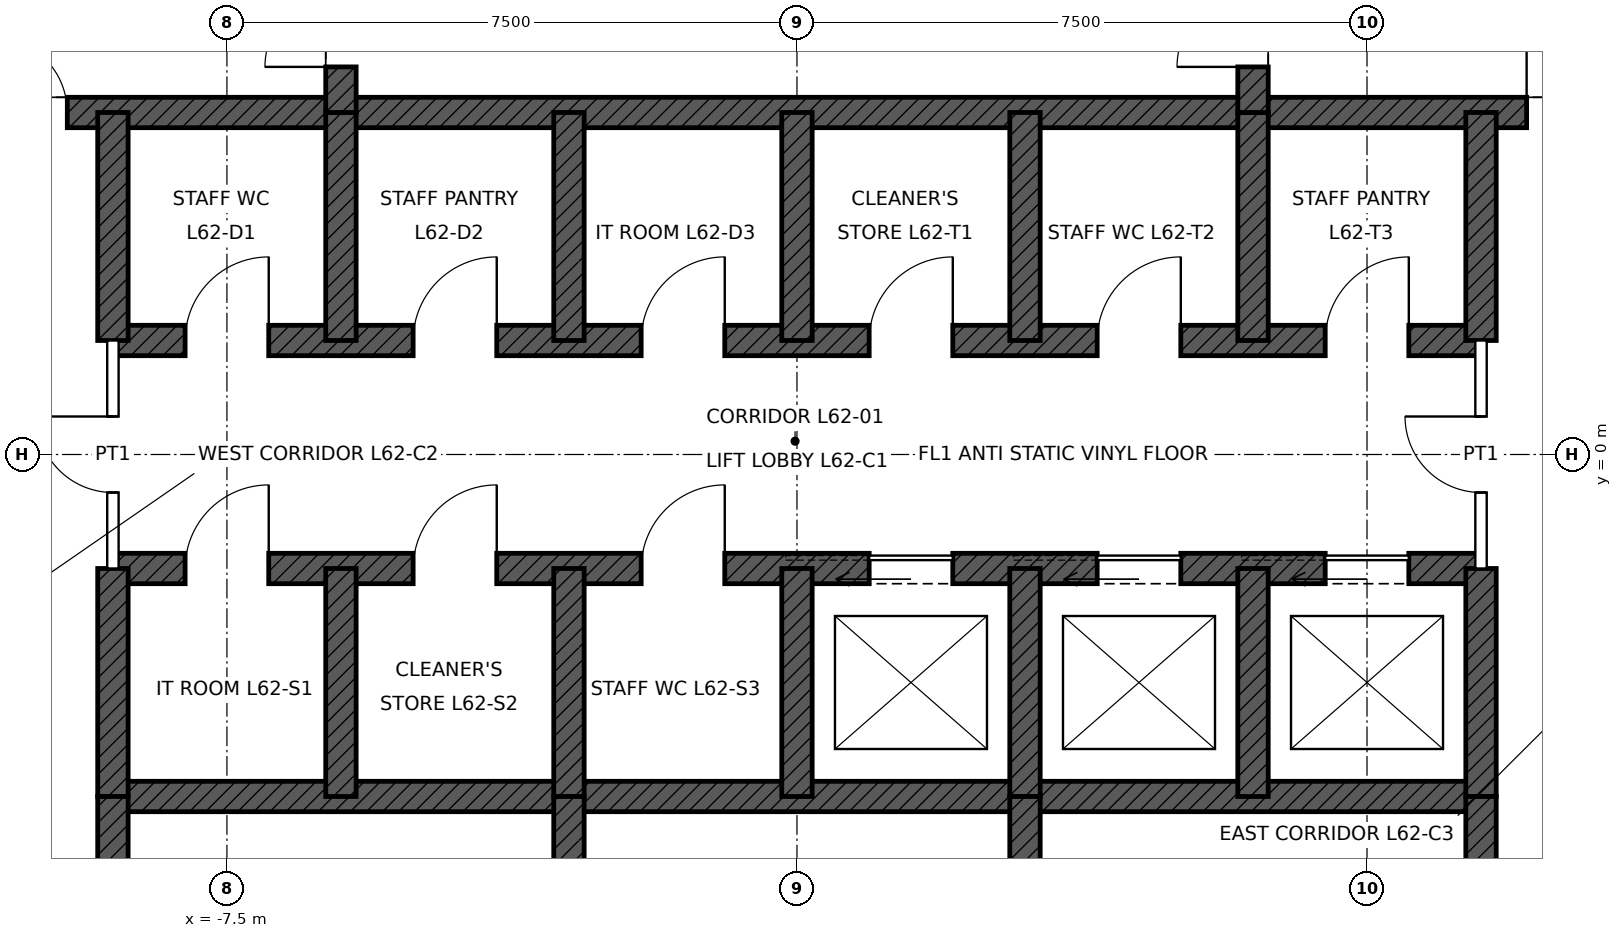
"""IFC4 building model, lengths in metres.
Left out: names, types, materials, properties, quantities, classifications, styles, units other than length and angle.
Written with IfcOpenShell. Run it as: python <this file> out.ifc"""

import sys

from ifc_helpers import new_model, si_unit, direction, frame, frame_2d, origin, place, context, subcontext, project, spatial, rectangle, extrude, element, fill, save


model = new_model("IFC4")
c1 = context("Model", 3, precision=1e-05, world=origin(), true_north=direction((0.0, 1.0)))
c2 = subcontext(c1, "Body", "Model", "MODEL_VIEW")
j1 = project(units=[si_unit("LENGTHUNIT", "METRE"), si_unit("PLANEANGLEUNIT", "RADIAN")], contexts=[c1])
p1 = place(None, origin())
s1 = spatial("IfcSite", under=j1, at=p1, CompositionType="ELEMENT")
p2 = place(p1, origin())
s2 = spatial("IfcBuilding", under=s1, at=p2, CompositionType="ELEMENT")
p3 = place(p2, frame((0.0, 0.0, 283.9)))
s3 = spatial("IfcBuildingStorey", under=s2, at=p3, CompositionType="ELEMENT", Elevation=283.9)
p4 = place(p3, frame((-11.0, 4.5, 0.0), z_axis=(0.0, 0.0, 1.0), x_axis=(1.0, 0.0, 0.0)))
e1 = element("IfcWall", 1, at=p4, inside=s3, PredefinedType="SHEAR", context=c2, shape_type="SweptSolid", body=[
    extrude(rectangle(XDim=22.0, YDim=0.4, at=frame_2d((11.0, 0.0))), origin(), (0.0, 0.0, 1.0), 4.0),
])
p5 = place(p4, frame((0.4, 0.0, 0.0)))
e2 = element("IfcOpeningElement", 2, at=p5, cuts=e1, PredefinedType="OPENING", context=c2, shape_type="SweptSolid", body=[
    extrude(rectangle(XDim=1.0, YDim=2.1, at=frame_2d((0.5, 1.05))), frame((0.0, 0.21, 0.0), z_axis=(0.0, -1.0, 0.0), x_axis=(1.0, 0.0, 0.0)), (0.0, 0.0, 1.0), 0.42),
])
p6 = place(p4, frame((20.6, 0.0, 0.0)))
e3 = element("IfcOpeningElement", 3, at=p6, cuts=e1, PredefinedType="OPENING", context=c2, shape_type="SweptSolid", body=[
    extrude(rectangle(XDim=1.0, YDim=2.1, at=frame_2d((0.5, 1.05))), frame((0.0, 0.21, 0.0), z_axis=(0.0, -1.0, 0.0), x_axis=(1.0, 0.0, 0.0)), (0.0, 0.0, 1.0), 0.42),
])
p7 = place(p3, frame((-9.0, 1.5, 0.0), z_axis=(0.0, 0.0, 1.0), x_axis=(1.0, 0.0, 0.0)))
e4 = element("IfcWall", 4, at=p7, inside=s3, PredefinedType="SHEAR", context=c2, shape_type="SweptSolid", body=[
    extrude(rectangle(XDim=18.0, YDim=0.4, at=frame_2d((9.0, 0.0))), origin(), (0.0, 0.0, 1.0), 4.0),
])
p8 = place(p7, frame((0.95, 0.0, 0.0)))
e5 = element("IfcOpeningElement", 5, at=p8, cuts=e4, PredefinedType="OPENING", context=c2, shape_type="SweptSolid", body=[
    extrude(rectangle(XDim=1.1, YDim=2.1, at=frame_2d((0.55, 1.05))), frame((0.0, 0.21, 0.0), z_axis=(0.0, -1.0, 0.0), x_axis=(1.0, 0.0, 0.0)), (0.0, 0.0, 1.0), 0.42),
])
p9 = place(p7, frame((3.95, 0.0, 0.0)))
e6 = element("IfcOpeningElement", 6, at=p9, cuts=e4, PredefinedType="OPENING", context=c2, shape_type="SweptSolid", body=[
    extrude(rectangle(XDim=1.1, YDim=2.1, at=frame_2d((0.55, 1.05))), frame((0.0, 0.21, 0.0), z_axis=(0.0, -1.0, 0.0), x_axis=(1.0, 0.0, 0.0)), (0.0, 0.0, 1.0), 0.42),
])
p10 = place(p7, frame((6.95, 0.0, 0.0)))
e7 = element("IfcOpeningElement", 7, at=p10, cuts=e4, PredefinedType="OPENING", context=c2, shape_type="SweptSolid", body=[
    extrude(rectangle(XDim=1.1, YDim=2.1, at=frame_2d((0.55, 1.05))), frame((0.0, 0.21, 0.0), z_axis=(0.0, -1.0, 0.0), x_axis=(1.0, 0.0, 0.0)), (0.0, 0.0, 1.0), 0.42),
])
p11 = place(p7, frame((9.95, 0.0, 0.0)))
e8 = element("IfcOpeningElement", 8, at=p11, cuts=e4, PredefinedType="OPENING", context=c2, shape_type="SweptSolid", body=[
    extrude(rectangle(XDim=1.1, YDim=2.1, at=frame_2d((0.55, 1.05))), frame((0.0, 0.21, 0.0), z_axis=(0.0, -1.0, 0.0), x_axis=(1.0, 0.0, 0.0)), (0.0, 0.0, 1.0), 0.42),
])
p12 = place(p7, frame((12.95, 0.0, 0.0)))
e9 = element("IfcOpeningElement", 9, at=p12, cuts=e4, PredefinedType="OPENING", context=c2, shape_type="SweptSolid", body=[
    extrude(rectangle(XDim=1.1, YDim=2.1, at=frame_2d((0.55, 1.05))), frame((0.0, 0.21, 0.0), z_axis=(0.0, -1.0, 0.0), x_axis=(1.0, 0.0, 0.0)), (0.0, 0.0, 1.0), 0.42),
])
p13 = place(p7, frame((15.95, 0.0, 0.0)))
e10 = element("IfcOpeningElement", 10, at=p13, cuts=e4, PredefinedType="OPENING", context=c2, shape_type="SweptSolid", body=[
    extrude(rectangle(XDim=1.1, YDim=2.1, at=frame_2d((0.55, 1.05))), frame((0.0, 0.21, 0.0), z_axis=(0.0, -1.0, 0.0), x_axis=(1.0, 0.0, 0.0)), (0.0, 0.0, 1.0), 0.42),
])
p14 = place(p3, frame((-9.0, -1.5, 0.0), z_axis=(0.0, 0.0, 1.0), x_axis=(1.0, 0.0, 0.0)))
e11 = element("IfcWall", 11, at=p14, inside=s3, PredefinedType="SHEAR", context=c2, shape_type="SweptSolid", body=[
    extrude(rectangle(XDim=18.0, YDim=0.4, at=frame_2d((9.0, 0.0))), origin(), (0.0, 0.0, 1.0), 4.0),
])
p15 = place(p14, frame((9.95, 0.0, 0.0)))
e12 = element("IfcOpeningElement", 12, at=p15, cuts=e11, PredefinedType="OPENING", context=c2, shape_type="SweptSolid", body=[
    extrude(rectangle(XDim=1.1, YDim=2.1, at=frame_2d((0.55, 1.05))), frame((0.0, 0.21, 0.0), z_axis=(0.0, -1.0, 0.0), x_axis=(1.0, 0.0, 0.0)), (0.0, 0.0, 1.0), 0.42),
])
p16 = place(p14, frame((12.95, 0.0, 0.0)))
e13 = element("IfcOpeningElement", 13, at=p16, cuts=e11, PredefinedType="OPENING", context=c2, shape_type="SweptSolid", body=[
    extrude(rectangle(XDim=1.1, YDim=2.1, at=frame_2d((0.55, 1.05))), frame((0.0, 0.21, 0.0), z_axis=(0.0, -1.0, 0.0), x_axis=(1.0, 0.0, 0.0)), (0.0, 0.0, 1.0), 0.42),
])
p17 = place(p14, frame((15.95, 0.0, 0.0)))
e14 = element("IfcOpeningElement", 14, at=p17, cuts=e11, PredefinedType="OPENING", context=c2, shape_type="SweptSolid", body=[
    extrude(rectangle(XDim=1.1, YDim=2.1, at=frame_2d((0.55, 1.05))), frame((0.0, 0.21, 0.0), z_axis=(0.0, -1.0, 0.0), x_axis=(1.0, 0.0, 0.0)), (0.0, 0.0, 1.0), 0.42),
])
p18 = place(p14, frame((0.95, 0.0, 0.0)))
e15 = element("IfcOpeningElement", 15, at=p18, cuts=e11, PredefinedType="OPENING", context=c2, shape_type="SweptSolid", body=[
    extrude(rectangle(XDim=1.1, YDim=2.1, at=frame_2d((0.55, 1.05))), frame((0.0, 0.21, 0.0), z_axis=(0.0, -1.0, 0.0), x_axis=(1.0, 0.0, 0.0)), (0.0, 0.0, 1.0), 0.42),
])
p19 = place(p14, frame((3.95, 0.0, 0.0)))
e16 = element("IfcOpeningElement", 16, at=p19, cuts=e11, PredefinedType="OPENING", context=c2, shape_type="SweptSolid", body=[
    extrude(rectangle(XDim=1.1, YDim=2.1, at=frame_2d((0.55, 1.05))), frame((0.0, 0.21, 0.0), z_axis=(0.0, -1.0, 0.0), x_axis=(1.0, 0.0, 0.0)), (0.0, 0.0, 1.0), 0.42),
])
p20 = place(p14, frame((6.95, 0.0, 0.0)))
e17 = element("IfcOpeningElement", 17, at=p20, cuts=e11, PredefinedType="OPENING", context=c2, shape_type="SweptSolid", body=[
    extrude(rectangle(XDim=1.1, YDim=2.1, at=frame_2d((0.55, 1.05))), frame((0.0, 0.21, 0.0), z_axis=(0.0, -1.0, 0.0), x_axis=(1.0, 0.0, 0.0)), (0.0, 0.0, 1.0), 0.42),
])
p21 = place(p3, frame((-9.0, -4.5, 0.0), z_axis=(0.0, 0.0, 1.0), x_axis=(1.0, 0.0, 0.0)))
e18 = element("IfcWall", 18, at=p21, inside=s3, PredefinedType="SHEAR", context=c2, shape_type="SweptSolid", body=[
    extrude(rectangle(XDim=18.0, YDim=0.4, at=frame_2d((9.0, 0.0))), origin(), (0.0, 0.0, 1.0), 4.0),
])
for number, where, z_axis, x_axis in (
    (19, (-9.0, 1.5, 0.0), (0.0, 0.0, 1.0), (0.0, 1.0, 0.0)),
    (20, (9.0, 1.5, 0.0), (0.0, 0.0, 1.0), (0.0, 1.0, 0.0)),
    (21, (-9.0, -4.5, 0.0), (0.0, 0.0, 1.0), (0.0, 1.0, 0.0)),
    (22, (9.0, -4.5, 0.0), (0.0, 0.0, 1.0), (0.0, 1.0, 0.0)),
    (23, (-6.0, 1.5, 0.0), (0.0, 0.0, 1.0), (0.0, 1.0, 0.0)),
    (24, (-3.0, 1.5, 0.0), (0.0, 0.0, 1.0), (0.0, 1.0, 0.0)),
    (25, (0.0, 1.5, 0.0), (0.0, 0.0, 1.0), (0.0, 1.0, 0.0)),
    (26, (3.0, 1.5, 0.0), (0.0, 0.0, 1.0), (0.0, 1.0, 0.0)),
    (27, (6.0, 1.5, 0.0), (0.0, 0.0, 1.0), (0.0, 1.0, 0.0)),
    (28, (-6.0, -4.5, 0.0), (0.0, 0.0, 1.0), (0.0, 1.0, 0.0)),
    (29, (-3.0, -4.5, 0.0), (0.0, 0.0, 1.0), (0.0, 1.0, 0.0)),
    (30, (0.0, -4.5, 0.0), (0.0, 0.0, 1.0), (0.0, 1.0, 0.0)),
    (31, (3.0, -4.5, 0.0), (0.0, 0.0, 1.0), (0.0, 1.0, 0.0)),
    (32, (6.0, -4.5, 0.0), (0.0, 0.0, 1.0), (0.0, 1.0, 0.0)),
):
    element("IfcWall", number, at=place(p3, frame(where, z_axis=z_axis, x_axis=x_axis)), inside=s3, PredefinedType="SHEAR", context=c2, shape_type="SweptSolid", body=[
        extrude(rectangle(XDim=3.0, YDim=0.4, at=frame_2d((1.5, 0.0))), origin(), (0.0, 0.0, 1.0), 4.0),
    ])
p22 = place(p3, frame((-6.0, 4.5, 0.0), z_axis=(0.0, 0.0, 1.0), x_axis=(0.0, 1.0, 0.0)))
e33 = element("IfcWall", 33, at=p22, inside=s3, PredefinedType="SHEAR", context=c2, shape_type="SweptSolid", body=[
    extrude(rectangle(XDim=6.5, YDim=0.4, at=frame_2d((3.25, 0.0))), origin(), (0.0, 0.0, 1.0), 4.0),
])
p23 = place(p22, frame((0.6, 0.0, 0.0)))
e34 = element("IfcOpeningElement", 34, at=p23, cuts=e33, PredefinedType="OPENING", context=c2, shape_type="SweptSolid", body=[
    extrude(rectangle(XDim=1.0, YDim=2.1, at=frame_2d((0.5, 1.05))), frame((0.0, 0.21, 0.0), z_axis=(0.0, -1.0, 0.0), x_axis=(1.0, 0.0, 0.0)), (0.0, 0.0, 1.0), 0.42),
])
p24 = place(p3, frame((6.0, 4.5, 0.0), z_axis=(0.0, 0.0, 1.0), x_axis=(0.0, 1.0, 0.0)))
e35 = element("IfcWall", 35, at=p24, inside=s3, PredefinedType="SHEAR", context=c2, shape_type="SweptSolid", body=[
    extrude(rectangle(XDim=6.5, YDim=0.4, at=frame_2d((3.25, 0.0))), origin(), (0.0, 0.0, 1.0), 4.0),
])
p25 = place(p24, frame((0.6, 0.0, 0.0)))
e36 = element("IfcOpeningElement", 36, at=p25, cuts=e35, PredefinedType="OPENING", context=c2, shape_type="SweptSolid", body=[
    extrude(rectangle(XDim=1.0, YDim=2.1, at=frame_2d((0.5, 1.05))), frame((0.0, 0.21, 0.0), z_axis=(0.0, -1.0, 0.0), x_axis=(1.0, 0.0, 0.0)), (0.0, 0.0, 1.0), 0.42),
])
p26 = place(p3, frame((-9.0, -11.0, 0.0), z_axis=(0.0, 0.0, 1.0), x_axis=(0.0, 1.0, 0.0)))
e37 = element("IfcWall", 37, at=p26, inside=s3, PredefinedType="SHEAR", context=c2, shape_type="SweptSolid", body=[
    extrude(rectangle(XDim=6.5, YDim=0.4, at=frame_2d((3.25, 0.0))), origin(), (0.0, 0.0, 1.0), 4.0),
])
p27 = place(p26, frame((4.25, 0.0, 0.0)))
e38 = element("IfcOpeningElement", 38, at=p27, cuts=e37, PredefinedType="OPENING", context=c2, shape_type="SweptSolid", body=[
    extrude(rectangle(XDim=1.0, YDim=2.1, at=frame_2d((0.5, 1.05))), frame((0.0, 0.21, 0.0), z_axis=(0.0, -1.0, 0.0), x_axis=(1.0, 0.0, 0.0)), (0.0, 0.0, 1.0), 0.42),
])
p28 = place(p3, frame((9.0, -11.0, 0.0), z_axis=(0.0, 0.0, 1.0), x_axis=(0.0, 1.0, 0.0)))
e39 = element("IfcWall", 39, at=p28, inside=s3, PredefinedType="SHEAR", context=c2, shape_type="SweptSolid", body=[
    extrude(rectangle(XDim=6.5, YDim=0.4, at=frame_2d((3.25, 0.0))), origin(), (0.0, 0.0, 1.0), 4.0),
])
p29 = place(p28, frame((4.25, 0.0, 0.0)))
e40 = element("IfcOpeningElement", 40, at=p29, cuts=e39, PredefinedType="OPENING", context=c2, shape_type="SweptSolid", body=[
    extrude(rectangle(XDim=1.0, YDim=2.1, at=frame_2d((0.5, 1.05))), frame((0.0, 0.21, 0.0), z_axis=(0.0, -1.0, 0.0), x_axis=(1.0, 0.0, 0.0)), (0.0, 0.0, 1.0), 0.42),
])
for number, where, z_axis, x_axis in (
    (41, (-3.0, -11.0, 0.0), (0.0, 0.0, 1.0), (0.0, 1.0, 0.0)),
    (42, (3.0, -11.0, 0.0), (0.0, 0.0, 1.0), (0.0, 1.0, 0.0)),
):
    element("IfcWall", number, at=place(p3, frame(where, z_axis=z_axis, x_axis=x_axis)), inside=s3, PredefinedType="SHEAR", context=c2, shape_type="SweptSolid", body=[
        extrude(rectangle(XDim=6.5, YDim=0.4, at=frame_2d((3.25, 0.0))), origin(), (0.0, 0.0, 1.0), 4.0),
    ])
p30 = place(p3, frame((-9.0, -1.5, 0.0), z_axis=(0.0, 0.0, 1.0), x_axis=(0.0, 1.0, 0.0)))
e43 = element("IfcWall", 43, at=p30, inside=s3, PredefinedType="PARTITIONING", context=c2, shape_type="SweptSolid", body=[
    extrude(rectangle(XDim=3.0, YDim=0.15, at=frame_2d((1.5, 0.0))), origin(), (0.0, 0.0, 1.0), 3.75),
])
p31 = place(p30, frame((1.0, 0.0, 0.0)))
e44 = element("IfcOpeningElement", 44, at=p31, cuts=e43, PredefinedType="OPENING", context=c2, shape_type="SweptSolid", body=[
    extrude(rectangle(XDim=1.0, YDim=2.4, at=frame_2d((0.5, 1.2))), frame((0.0, 0.085, 0.0), z_axis=(0.0, -1.0, 0.0), x_axis=(1.0, 0.0, 0.0)), (0.0, 0.0, 1.0), 0.17),
])
p32 = place(p3, frame((9.0, -1.5, 0.0), z_axis=(0.0, 0.0, 1.0), x_axis=(0.0, 1.0, 0.0)))
e45 = element("IfcWall", 45, at=p32, inside=s3, PredefinedType="PARTITIONING", context=c2, shape_type="SweptSolid", body=[
    extrude(rectangle(XDim=3.0, YDim=0.15, at=frame_2d((1.5, 0.0))), origin(), (0.0, 0.0, 1.0), 3.75),
])
p33 = place(p32, frame((1.0, 0.0, 0.0)))
e46 = element("IfcOpeningElement", 46, at=p33, cuts=e45, PredefinedType="OPENING", context=c2, shape_type="SweptSolid", body=[
    extrude(rectangle(XDim=1.0, YDim=2.4, at=frame_2d((0.5, 1.2))), frame((0.0, 0.085, 0.0), z_axis=(0.0, -1.0, 0.0), x_axis=(1.0, 0.0, 0.0)), (0.0, 0.0, 1.0), 0.17),
])
p34 = place(p5, origin())
e47 = element("IfcDoor", 47, at=p34, inside=s3, OperationType="SINGLE_SWING_LEFT", PredefinedType="DOOR", context=c2, shape_type="SweptSolid", body=[
    extrude(rectangle(XDim=1.0, YDim=2.1, at=frame_2d((0.5, 1.05))), frame((0.0, 0.025, 0.0), z_axis=(0.0, -1.0, 0.0), x_axis=(1.0, 0.0, 0.0)), (0.0, 0.0, 1.0), 0.05),
])
fill(e2, e47)
p35 = place(p6, origin())
e48 = element("IfcDoor", 48, at=p35, inside=s3, OperationType="SINGLE_SWING_LEFT", PredefinedType="DOOR", context=c2, shape_type="SweptSolid", body=[
    extrude(rectangle(XDim=1.0, YDim=2.1, at=frame_2d((0.5, 1.05))), frame((0.0, 0.025, 0.0), z_axis=(0.0, -1.0, 0.0), x_axis=(1.0, 0.0, 0.0)), (0.0, 0.0, 1.0), 0.05),
])
fill(e3, e48)
p36 = place(p23, origin())
e49 = element("IfcDoor", 49, at=p36, inside=s3, OperationType="SINGLE_SWING_LEFT", PredefinedType="DOOR", context=c2, shape_type="SweptSolid", body=[
    extrude(rectangle(XDim=1.0, YDim=2.1, at=frame_2d((0.5, 1.05))), frame((0.0, 0.025, 0.0), z_axis=(0.0, -1.0, 0.0), x_axis=(1.0, 0.0, 0.0)), (0.0, 0.0, 1.0), 0.05),
])
fill(e34, e49)
p37 = place(p25, origin())
e50 = element("IfcDoor", 50, at=p37, inside=s3, OperationType="SINGLE_SWING_LEFT", PredefinedType="DOOR", context=c2, shape_type="SweptSolid", body=[
    extrude(rectangle(XDim=1.0, YDim=2.1, at=frame_2d((0.5, 1.05))), frame((0.0, 0.025, 0.0), z_axis=(0.0, -1.0, 0.0), x_axis=(1.0, 0.0, 0.0)), (0.0, 0.0, 1.0), 0.05),
])
fill(e36, e50)
p38 = place(p15, origin())
e51 = element("IfcDoor", 51, at=p38, inside=s3, OperationType="SLIDING_TO_LEFT", PredefinedType="DOOR", context=c2, shape_type="SweptSolid", body=[
    extrude(rectangle(XDim=1.1, YDim=2.1, at=frame_2d((0.55, 1.05))), frame((0.0, 0.025, 0.0), z_axis=(0.0, -1.0, 0.0), x_axis=(1.0, 0.0, 0.0)), (0.0, 0.0, 1.0), 0.05),
])
fill(e12, e51)
p39 = place(p16, origin())
e52 = element("IfcDoor", 52, at=p39, inside=s3, OperationType="SLIDING_TO_LEFT", PredefinedType="DOOR", context=c2, shape_type="SweptSolid", body=[
    extrude(rectangle(XDim=1.1, YDim=2.1, at=frame_2d((0.55, 1.05))), frame((0.0, 0.025, 0.0), z_axis=(0.0, -1.0, 0.0), x_axis=(1.0, 0.0, 0.0)), (0.0, 0.0, 1.0), 0.05),
])
fill(e13, e52)
p40 = place(p17, origin())
e53 = element("IfcDoor", 53, at=p40, inside=s3, OperationType="SLIDING_TO_LEFT", PredefinedType="DOOR", context=c2, shape_type="SweptSolid", body=[
    extrude(rectangle(XDim=1.1, YDim=2.1, at=frame_2d((0.55, 1.05))), frame((0.0, 0.025, 0.0), z_axis=(0.0, -1.0, 0.0), x_axis=(1.0, 0.0, 0.0)), (0.0, 0.0, 1.0), 0.05),
])
fill(e14, e53)
p41 = place(p31, origin())
e54 = element("IfcDoor", 54, at=p41, inside=s3, OperationType="SINGLE_SWING_RIGHT", PredefinedType="DOOR", context=c2, shape_type="SweptSolid", body=[
    extrude(rectangle(XDim=1.0, YDim=2.4, at=frame_2d((0.5, 1.2))), frame((0.0, 0.025, 0.0), z_axis=(0.0, -1.0, 0.0), x_axis=(1.0, 0.0, 0.0)), (0.0, 0.0, 1.0), 0.05),
])
fill(e44, e54)
p42 = place(p33, origin())
e55 = element("IfcDoor", 55, at=p42, inside=s3, OperationType="SINGLE_SWING_RIGHT", PredefinedType="DOOR", context=c2, shape_type="SweptSolid", body=[
    extrude(rectangle(XDim=1.0, YDim=2.4, at=frame_2d((0.5, 1.2))), frame((0.0, 0.025, 0.0), z_axis=(0.0, -1.0, 0.0), x_axis=(1.0, 0.0, 0.0)), (0.0, 0.0, 1.0), 0.05),
])
fill(e46, e55)
p43 = place(p8, origin())
e56 = element("IfcDoor", 56, at=p43, inside=s3, OperationType="SINGLE_SWING_RIGHT", PredefinedType="DOOR", context=c2, shape_type="SweptSolid", body=[
    extrude(rectangle(XDim=1.1, YDim=2.1, at=frame_2d((0.55, 1.05))), frame((0.0, 0.025, 0.0), z_axis=(0.0, -1.0, 0.0), x_axis=(1.0, 0.0, 0.0)), (0.0, 0.0, 1.0), 0.05),
])
fill(e5, e56)
p44 = place(p9, origin())
e57 = element("IfcDoor", 57, at=p44, inside=s3, OperationType="SINGLE_SWING_RIGHT", PredefinedType="DOOR", context=c2, shape_type="SweptSolid", body=[
    extrude(rectangle(XDim=1.1, YDim=2.1, at=frame_2d((0.55, 1.05))), frame((0.0, 0.025, 0.0), z_axis=(0.0, -1.0, 0.0), x_axis=(1.0, 0.0, 0.0)), (0.0, 0.0, 1.0), 0.05),
])
fill(e6, e57)
p45 = place(p10, origin())
e58 = element("IfcDoor", 58, at=p45, inside=s3, OperationType="SINGLE_SWING_RIGHT", PredefinedType="DOOR", context=c2, shape_type="SweptSolid", body=[
    extrude(rectangle(XDim=1.1, YDim=2.1, at=frame_2d((0.55, 1.05))), frame((0.0, 0.025, 0.0), z_axis=(0.0, -1.0, 0.0), x_axis=(1.0, 0.0, 0.0)), (0.0, 0.0, 1.0), 0.05),
])
fill(e7, e58)
p46 = place(p11, origin())
e59 = element("IfcDoor", 59, at=p46, inside=s3, OperationType="SINGLE_SWING_RIGHT", PredefinedType="DOOR", context=c2, shape_type="SweptSolid", body=[
    extrude(rectangle(XDim=1.1, YDim=2.1, at=frame_2d((0.55, 1.05))), frame((0.0, 0.025, 0.0), z_axis=(0.0, -1.0, 0.0), x_axis=(1.0, 0.0, 0.0)), (0.0, 0.0, 1.0), 0.05),
])
fill(e8, e59)
p47 = place(p12, origin())
e60 = element("IfcDoor", 60, at=p47, inside=s3, OperationType="SINGLE_SWING_RIGHT", PredefinedType="DOOR", context=c2, shape_type="SweptSolid", body=[
    extrude(rectangle(XDim=1.1, YDim=2.1, at=frame_2d((0.55, 1.05))), frame((0.0, 0.025, 0.0), z_axis=(0.0, -1.0, 0.0), x_axis=(1.0, 0.0, 0.0)), (0.0, 0.0, 1.0), 0.05),
])
fill(e9, e60)
p48 = place(p13, origin())
e61 = element("IfcDoor", 61, at=p48, inside=s3, OperationType="SINGLE_SWING_RIGHT", PredefinedType="DOOR", context=c2, shape_type="SweptSolid", body=[
    extrude(rectangle(XDim=1.1, YDim=2.1, at=frame_2d((0.55, 1.05))), frame((0.0, 0.025, 0.0), z_axis=(0.0, -1.0, 0.0), x_axis=(1.0, 0.0, 0.0)), (0.0, 0.0, 1.0), 0.05),
])
fill(e10, e61)
p49 = place(p18, origin())
e62 = element("IfcDoor", 62, at=p49, inside=s3, OperationType="SINGLE_SWING_RIGHT", PredefinedType="DOOR", context=c2, shape_type="SweptSolid", body=[
    extrude(rectangle(XDim=1.1, YDim=2.1, at=frame_2d((0.55, 1.05))), frame((0.0, 0.025, 0.0), z_axis=(0.0, -1.0, 0.0), x_axis=(1.0, 0.0, 0.0)), (0.0, 0.0, 1.0), 0.05),
])
fill(e15, e62)
p50 = place(p19, origin())
e63 = element("IfcDoor", 63, at=p50, inside=s3, OperationType="SINGLE_SWING_RIGHT", PredefinedType="DOOR", context=c2, shape_type="SweptSolid", body=[
    extrude(rectangle(XDim=1.1, YDim=2.1, at=frame_2d((0.55, 1.05))), frame((0.0, 0.025, 0.0), z_axis=(0.0, -1.0, 0.0), x_axis=(1.0, 0.0, 0.0)), (0.0, 0.0, 1.0), 0.05),
])
fill(e16, e63)
p51 = place(p20, origin())
e64 = element("IfcDoor", 64, at=p51, inside=s3, OperationType="SINGLE_SWING_RIGHT", PredefinedType="DOOR", context=c2, shape_type="SweptSolid", body=[
    extrude(rectangle(XDim=1.1, YDim=2.1, at=frame_2d((0.55, 1.05))), frame((0.0, 0.025, 0.0), z_axis=(0.0, -1.0, 0.0), x_axis=(1.0, 0.0, 0.0)), (0.0, 0.0, 1.0), 0.05),
])
fill(e17, e64)
save(model, sys.argv[1])
